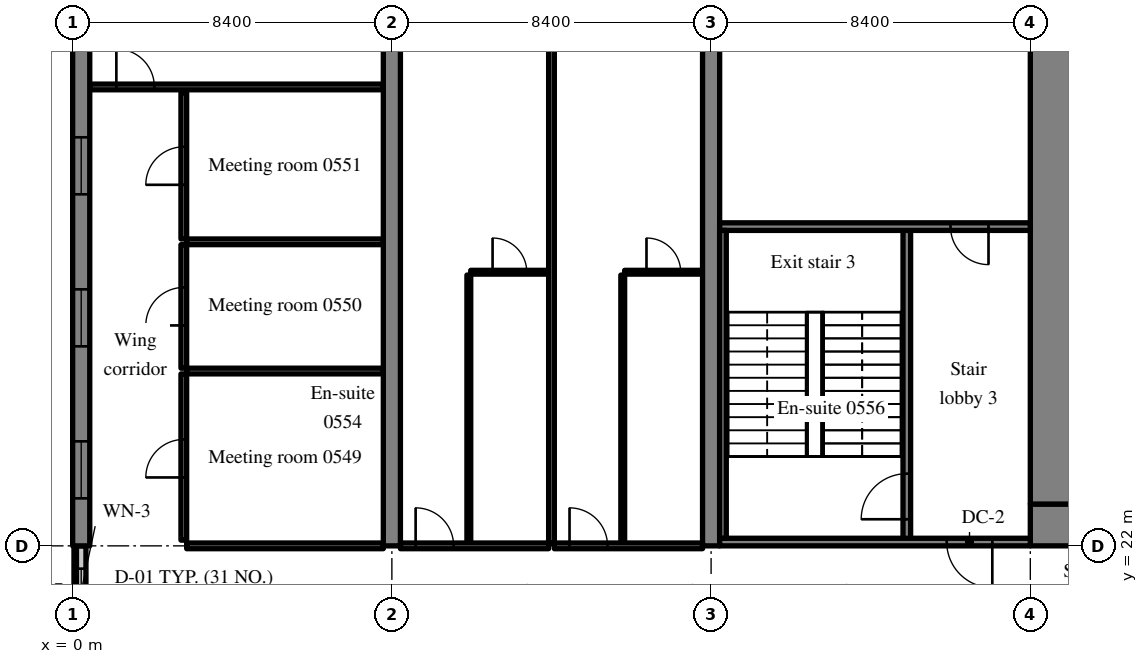
"""IFC4 building model, lengths in metres.
Left out: names, types, materials, properties, quantities, classifications, styles, units other than length and angle.
Written with IfcOpenShell. Run it as: python <this file> out.ifc"""

import sys

from ifc_helpers import new_model, si_unit, direction, frame, frame_2d, origin, place, context, subcontext, project, spatial, rectangle, extrude, source, transform, mapped, element, fill, save


model = new_model("IFC4")
c1 = context("Model", 3, precision=1e-05, world=origin(), true_north=direction((0.0, 1.0)))
c2 = subcontext(c1, "Body", "Model", "MODEL_VIEW")
j1 = project(units=[si_unit("LENGTHUNIT", "METRE"), si_unit("PLANEANGLEUNIT", "RADIAN")], contexts=[c1])
p1 = place(None, origin())
s1 = spatial("IfcSite", under=j1, at=p1, CompositionType="ELEMENT")
p2 = place(p1, origin())
s2 = spatial("IfcBuilding", under=s1, at=p2, CompositionType="ELEMENT")
p3 = place(p2, frame((0.0, 0.0, 27.8)))
s3 = spatial("IfcBuildingStorey", under=s2, at=p3, CompositionType="ELEMENT", Elevation=27.8)
m1 = source(origin(), c2, "Body", "SweptSolid", [
    extrude(rectangle(XDim=50.4, YDim=1.1, at=frame_2d((25.2, 0.0))), origin(), (0.0, 0.0, 1.0), 3.52),
])
p4 = place(p3, frame((25.2, 22.55, 0.0), z_axis=(0.0, 0.0, 1.0), x_axis=(1.0, 0.0, 0.0)))
e1 = element("IfcWall", 1, at=p4, inside=s3, PredefinedType="SHEAR", context=c2, shape_type="MappedRepresentation", body=[
    mapped(m1, transform((0.0, 0.0, 0.0), scale=1.0)),
])
m2 = source(origin(), c2, "Body", "SweptSolid", [
    extrude(rectangle(XDim=1.8, YDim=2.1, at=frame_2d((0.9, 1.05))), frame((0.0, 0.56, 0.0), z_axis=(0.0, -1.0, 0.0), x_axis=(1.0, 0.0, 0.0)), (0.0, 0.0, 1.0), 1.12),
])
p5 = place(p4, frame((15.9, 0.0, 0.0)))
e2 = element("IfcOpeningElement", 2, at=p5, cuts=e1, PredefinedType="OPENING", context=c2, shape_type="MappedRepresentation", body=[
    mapped(m2, transform((0.0, 0.0, 0.0), scale=1.0)),
])
m3 = source(origin(), c2, "Body", "SweptSolid", [
    extrude(rectangle(XDim=1.2, YDim=2.1, at=frame_2d((0.6, 1.05))), frame((0.0, 0.56, 0.0), z_axis=(0.0, -1.0, 0.0), x_axis=(1.0, 0.0, 0.0)), (0.0, 0.0, 1.0), 1.12),
])
p6 = place(p4, frame((27.0, 0.0, 0.0)))
e3 = element("IfcOpeningElement", 3, at=p6, cuts=e1, PredefinedType="OPENING", context=c2, shape_type="MappedRepresentation", body=[
    mapped(m3, transform((0.0, 0.0, 0.0), scale=1.0)),
])
m4 = source(origin(), c2, "Body", "SweptSolid", [
    extrude(rectangle(XDim=0.9, YDim=2.1, at=frame_2d((0.45, 1.05))), frame((0.0, 0.56, 0.0), z_axis=(0.0, -1.0, 0.0), x_axis=(1.0, 0.0, 0.0)), (0.0, 0.0, 1.0), 1.12),
])
p7 = place(p4, frame((32.25, 0.0, 0.0)))
e4 = element("IfcOpeningElement", 4, at=p7, cuts=e1, PredefinedType="OPENING", context=c2, shape_type="MappedRepresentation", body=[
    mapped(m4, transform((0.0, 0.0, 0.0), scale=1.0)),
])
p8 = place(p4, frame((38.25, 0.0, 0.0)))
e5 = element("IfcOpeningElement", 5, at=p8, cuts=e1, PredefinedType="OPENING", context=c2, shape_type="MappedRepresentation", body=[
    mapped(m4, transform((0.0, 0.0, 0.0), scale=1.0)),
])
p9 = place(p4, frame((6.425, 0.0, 0.0)))
e6 = element("IfcOpeningElement", 6, at=p9, cuts=e1, PredefinedType="OPENING", context=c2, shape_type="MappedRepresentation", body=[
    mapped(m3, transform((0.0, 0.0, 0.0), scale=1.0)),
])
p10 = place(p4, frame((47.675, 0.0, 0.0)))
e7 = element("IfcOpeningElement", 7, at=p10, cuts=e1, PredefinedType="OPENING", context=c2, shape_type="MappedRepresentation", body=[
    mapped(m3, transform((0.0, 0.0, 0.0), scale=1.0)),
])
m5 = source(origin(), c2, "Body", "SweptSolid", [
    extrude(rectangle(XDim=17.8, YDim=1.1, at=frame_2d((8.9, 0.0))), origin(), (0.0, 0.0, 1.0), 3.52),
])
p11 = place(p3, frame((25.75, 23.1, 0.0), z_axis=(0.0, 0.0, 1.0), x_axis=(0.0, 1.0, 0.0)))
e8 = element("IfcWall", 8, at=p11, inside=s3, PredefinedType="SHEAR", context=c2, shape_type="MappedRepresentation", body=[
    mapped(m5, transform((0.0, 0.0, 0.0), scale=1.0)),
])
m6 = source(origin(), c2, "Body", "SweptSolid", [
    extrude(rectangle(XDim=16.0, YDim=0.45, at=frame_2d((8.0, 0.0))), origin(), (0.0, 0.0, 1.0), 3.52),
])
p12 = place(p3, frame((0.225, 22.0, 0.0), z_axis=(0.0, 0.0, 1.0), x_axis=(0.0, 1.0, 0.0)))
e9 = element("IfcWall", 9, at=p12, inside=s3, PredefinedType="SHEAR", context=c2, shape_type="MappedRepresentation", body=[
    mapped(m6, transform((0.0, 0.0, 0.0), scale=1.0)),
])
m7 = source(origin(), c2, "Body", "SweptSolid", [
    extrude(rectangle(XDim=1.5, YDim=1.5, at=frame_2d((0.75, 0.75))), frame((0.0, 0.235, 0.0), z_axis=(0.0, -1.0, 0.0), x_axis=(1.0, 0.0, 0.0)), (0.0, 0.0, 1.0), 0.47),
])
p13 = place(p12, frame((1.25, 0.0, 0.9)))
e10 = element("IfcOpeningElement", 10, at=p13, cuts=e9, PredefinedType="OPENING", context=c2, shape_type="MappedRepresentation", body=[
    mapped(m7, transform((0.0, 0.0, 0.0), scale=1.0)),
])
p14 = place(p12, frame((5.25, 0.0, 0.9)))
e11 = element("IfcOpeningElement", 11, at=p14, cuts=e9, PredefinedType="OPENING", context=c2, shape_type="MappedRepresentation", body=[
    mapped(m7, transform((0.0, 0.0, 0.0), scale=1.0)),
])
p15 = place(p12, frame((9.25, 0.0, 0.9)))
e12 = element("IfcOpeningElement", 12, at=p15, cuts=e9, PredefinedType="OPENING", context=c2, shape_type="MappedRepresentation", body=[
    mapped(m7, transform((0.0, 0.0, 0.0), scale=1.0)),
])
p16 = place(p12, frame((13.25, 0.0, 0.9)))
e13 = element("IfcOpeningElement", 13, at=p16, cuts=e9, PredefinedType="OPENING", context=c2, shape_type="MappedRepresentation", body=[
    mapped(m7, transform((0.0, 0.0, 0.0), scale=1.0)),
])
m8 = source(origin(), c2, "Body", "SweptSolid", [
    extrude(rectangle(XDim=20.0, YDim=0.45, at=frame_2d((10.0, 0.0))), origin(), (0.0, 0.0, 1.0), 3.52),
])
for number, where, z_axis, x_axis in (
    (14, (8.4, 22.0, 0.0), (0.0, 0.0, 1.0), (0.0, 1.0, 0.0)),
    (15, (16.8, 22.0, 0.0), (0.0, 0.0, 1.0), (0.0, 1.0, 0.0)),
):
    element("IfcWall", number, at=place(p3, frame(where, z_axis=z_axis, x_axis=x_axis)), inside=s3, PredefinedType="SHEAR", context=c2, shape_type="MappedRepresentation", body=[
        mapped(m8, transform((0.0, 0.0, 0.0), scale=1.0)),
    ])
m9 = source(origin(), c2, "Body", "SweptSolid", [
    extrude(rectangle(XDim=2.4, YDim=0.25, at=frame_2d((1.2, 0.0))), origin(), (0.0, 0.0, 1.0), 2.62),
])
p17 = place(p3, frame((0.225, 19.6, 0.0), z_axis=(0.0, 0.0, 1.0), x_axis=(0.0, 1.0, 0.0)))
e16 = element("IfcWall", 16, at=p17, inside=s3, PredefinedType="SOLIDWALL", context=c2, shape_type="MappedRepresentation", body=[
    mapped(m9, transform((0.0, 0.0, 0.0), scale=1.0)),
])
m10 = source(origin(), c2, "Body", "SweptSolid", [
    extrude(rectangle(XDim=1.2, YDim=1.5, at=frame_2d((0.6, 0.75))), frame((0.0, 0.135, 0.0), z_axis=(0.0, -1.0, 0.0), x_axis=(1.0, 0.0, 0.0)), (0.0, 0.0, 1.0), 0.27),
])
p18 = place(p17, frame((0.6, 0.0, 0.9)))
e17 = element("IfcOpeningElement", 17, at=p18, cuts=e16, PredefinedType="OPENING", context=c2, shape_type="MappedRepresentation", body=[
    mapped(m10, transform((0.0, 0.0, 0.0), scale=1.0)),
])
m11 = source(origin(), c2, "Body", "SweptSolid", [
    extrude(rectangle(XDim=8.3, YDim=0.2, at=frame_2d((4.15, 0.0))), origin(), (0.0, 0.0, 1.0), 3.52),
])
p19 = place(p3, frame((21.95, 22.1, 0.0), z_axis=(0.0, 0.0, 1.0), x_axis=(0.0, 1.0, 0.0)))
e18 = element("IfcWall", 18, at=p19, inside=s3, PredefinedType="SOLIDWALL", context=c2, shape_type="MappedRepresentation", body=[
    mapped(m11, transform((0.0, 0.0, 0.0), scale=1.0)),
])
m12 = source(origin(), c2, "Body", "SweptSolid", [
    extrude(rectangle(XDim=1.2, YDim=2.1, at=frame_2d((0.6, 1.05))), frame((0.0, 0.11, 0.0), z_axis=(0.0, -1.0, 0.0), x_axis=(1.0, 0.0, 0.0)), (0.0, 0.0, 1.0), 0.22),
])
p20 = place(p19, frame((0.6, 0.0, 0.0)))
e19 = element("IfcOpeningElement", 19, at=p20, cuts=e18, PredefinedType="OPENING", context=c2, shape_type="MappedRepresentation", body=[
    mapped(m12, transform((0.0, 0.0, 0.0), scale=1.0)),
])
m13 = source(origin(), c2, "Body", "SweptSolid", [
    extrude(rectangle(XDim=8.175, YDim=0.2, at=frame_2d((4.087, 0.0))), origin(), (0.0, 0.0, 1.0), 3.52),
])
p21 = place(p3, frame((17.025, 22.1, 0.0), z_axis=(0.0, 0.0, 1.0), x_axis=(1.0, 0.0, 0.0)))
e20 = element("IfcWall", 20, at=p21, inside=s3, PredefinedType="SOLIDWALL", context=c2, shape_type="MappedRepresentation", body=[
    mapped(m13, transform((0.0, 0.0, 0.0), scale=1.0)),
])
p22 = place(p21, frame((5.975, 0.0, 0.0)))
e21 = element("IfcOpeningElement", 21, at=p22, cuts=e20, PredefinedType="OPENING", context=c2, shape_type="MappedRepresentation", body=[
    mapped(m12, transform((0.0, 0.0, 0.0), scale=1.0)),
])
p23 = place(p3, frame((17.025, 30.4, 0.0), z_axis=(0.0, 0.0, 1.0), x_axis=(1.0, 0.0, 0.0)))
e22 = element("IfcWall", 22, at=p23, inside=s3, PredefinedType="SOLIDWALL", context=c2, shape_type="MappedRepresentation", body=[
    mapped(m13, transform((0.0, 0.0, 0.0), scale=1.0)),
])
m14 = source(origin(), c2, "Body", "SweptSolid", [
    extrude(rectangle(XDim=1.0, YDim=2.1, at=frame_2d((0.5, 1.05))), frame((0.0, 0.11, 0.0), z_axis=(0.0, -1.0, 0.0), x_axis=(1.0, 0.0, 0.0)), (0.0, 0.0, 1.0), 0.22),
])
p24 = place(p23, frame((6.075, 0.0, 0.0)))
e23 = element("IfcOpeningElement", 23, at=p24, cuts=e22, PredefinedType="OPENING", context=c2, shape_type="MappedRepresentation", body=[
    mapped(m14, transform((0.0, 0.0, 0.0), scale=1.0)),
])
m15 = source(origin(), c2, "Body", "SweptSolid", [
    extrude(rectangle(XDim=8.1, YDim=0.175, at=frame_2d((4.05, 0.0))), origin(), (0.0, 0.0, 1.0), 3.52),
])
p25 = place(p3, frame((17.112, 22.2, 0.0), z_axis=(0.0, 0.0, 1.0), x_axis=(0.0, 1.0, 0.0)))
e24 = element("IfcWall", 24, at=p25, inside=s3, PredefinedType="SOLIDWALL", context=c2, shape_type="MappedRepresentation", body=[
    mapped(m15, transform((0.0, 0.0, 0.0), scale=1.0)),
])
m16 = source(origin(), c2, "Body", "SweptSolid", [
    extrude(rectangle(XDim=5.175, YDim=0.15, at=frame_2d((2.587, 0.0))), origin(), (0.0, 0.0, 1.0), 2.82),
])
p26 = place(p3, frame((3.0, 22.0, 0.0), z_axis=(0.0, 0.0, 1.0), x_axis=(1.0, 0.0, 0.0)))
e25 = element("IfcWall", 25, at=p26, inside=s3, PredefinedType="PARTITIONING", context=c2, shape_type="MappedRepresentation", body=[
    mapped(m16, transform((0.0, 0.0, 0.0), scale=1.0)),
])
m17 = source(origin(), c2, "Body", "SweptSolid", [
    extrude(rectangle(XDim=4.375, YDim=0.15, at=frame_2d((2.188, 0.0))), origin(), (0.0, 0.0, 1.0), 3.52),
])
p27 = place(p3, frame((2.925, 22.15, 0.0), z_axis=(0.0, 0.0, 1.0), x_axis=(0.0, 1.0, 0.0)))
e26 = element("IfcWall", 26, at=p27, inside=s3, PredefinedType="PARTITIONING", context=c2, shape_type="MappedRepresentation", body=[
    mapped(m17, transform((0.0, 0.0, 0.0), scale=1.0)),
])
m18 = source(origin(), c2, "Body", "SweptSolid", [
    extrude(rectangle(XDim=1.0, YDim=2.1, at=frame_2d((0.5, 1.05))), frame((0.0, 0.085, 0.0), z_axis=(0.0, -1.0, 0.0), x_axis=(1.0, 0.0, 0.0)), (0.0, 0.0, 1.0), 0.17),
])
p28 = place(p27, frame((1.65, 0.0, 0.0)))
e27 = element("IfcOpeningElement", 27, at=p28, cuts=e26, PredefinedType="OPENING", context=c2, shape_type="MappedRepresentation", body=[
    mapped(m18, transform((0.0, 0.0, 0.0), scale=1.0)),
])
m19 = source(origin(), c2, "Body", "SweptSolid", [
    extrude(rectangle(XDim=5.175, YDim=0.15, at=frame_2d((2.587, 0.0))), origin(), (0.0, 0.0, 1.0), 3.52),
])
p29 = place(p3, frame((3.0, 26.6, 0.0), z_axis=(0.0, 0.0, 1.0), x_axis=(1.0, 0.0, 0.0)))
e28 = element("IfcWall", 28, at=p29, inside=s3, PredefinedType="PARTITIONING", context=c2, shape_type="MappedRepresentation", body=[
    mapped(m19, transform((0.0, 0.0, 0.0), scale=1.0)),
])
m20 = source(origin(), c2, "Body", "SweptSolid", [
    extrude(rectangle(XDim=3.25, YDim=0.15, at=frame_2d((1.625, 0.0))), origin(), (0.0, 0.0, 1.0), 3.52),
])
p30 = place(p3, frame((2.925, 26.675, 0.0), z_axis=(0.0, 0.0, 1.0), x_axis=(0.0, 1.0, 0.0)))
e29 = element("IfcWall", 29, at=p30, inside=s3, PredefinedType="PARTITIONING", context=c2, shape_type="MappedRepresentation", body=[
    mapped(m20, transform((0.0, 0.0, 0.0), scale=1.0)),
])
p31 = place(p30, frame((1.125, 0.0, 0.0)))
e30 = element("IfcOpeningElement", 30, at=p31, cuts=e29, PredefinedType="OPENING", context=c2, shape_type="MappedRepresentation", body=[
    mapped(m18, transform((0.0, 0.0, 0.0), scale=1.0)),
])
p32 = place(p3, frame((3.0, 30.0, 0.0), z_axis=(0.0, 0.0, 1.0), x_axis=(1.0, 0.0, 0.0)))
e31 = element("IfcWall", 31, at=p32, inside=s3, PredefinedType="PARTITIONING", context=c2, shape_type="MappedRepresentation", body=[
    mapped(m19, transform((0.0, 0.0, 0.0), scale=1.0)),
])
m21 = source(origin(), c2, "Body", "SweptSolid", [
    extrude(rectangle(XDim=3.85, YDim=0.15, at=frame_2d((1.925, 0.0))), origin(), (0.0, 0.0, 1.0), 3.52),
])
p33 = place(p3, frame((2.925, 30.075, 0.0), z_axis=(0.0, 0.0, 1.0), x_axis=(0.0, 1.0, 0.0)))
e32 = element("IfcWall", 32, at=p33, inside=s3, PredefinedType="PARTITIONING", context=c2, shape_type="MappedRepresentation", body=[
    mapped(m21, transform((0.0, 0.0, 0.0), scale=1.0)),
])
p34 = place(p33, frame((1.425, 0.0, 0.0)))
e33 = element("IfcOpeningElement", 33, at=p34, cuts=e32, PredefinedType="OPENING", context=c2, shape_type="MappedRepresentation", body=[
    mapped(m18, transform((0.0, 0.0, 0.0), scale=1.0)),
])
m22 = source(origin(), c2, "Body", "SweptSolid", [
    extrude(rectangle(XDim=7.725, YDim=0.15, at=frame_2d((3.863, 0.0))), origin(), (0.0, 0.0, 1.0), 3.52),
])
p35 = place(p3, frame((0.45, 34.075, 0.0), z_axis=(0.0, 0.0, 1.0), x_axis=(1.0, 0.0, 0.0)))
e34 = element("IfcWall", 34, at=p35, inside=s3, PredefinedType="PARTITIONING", context=c2, shape_type="MappedRepresentation", body=[
    mapped(m22, transform((0.0, 0.0, 0.0), scale=1.0)),
])
p36 = place(p35, frame((0.7, 0.0, 0.0)))
e35 = element("IfcOpeningElement", 35, at=p36, cuts=e34, PredefinedType="OPENING", context=c2, shape_type="MappedRepresentation", body=[
    mapped(m18, transform((0.0, 0.0, 0.0), scale=1.0)),
])
m23 = source(origin(), c2, "Body", "SweptSolid", [
    extrude(rectangle(XDim=7.05, YDim=0.1, at=frame_2d((3.525, 0.0))), origin(), (0.0, 0.0, 1.0), 3.52),
])
p37 = place(p3, frame((10.425, 22.075, 0.0), z_axis=(0.0, 0.0, 1.0), x_axis=(0.0, 1.0, 0.0)))
e36 = element("IfcWall", 36, at=p37, inside=s3, PredefinedType="PARTITIONING", context=c2, shape_type="MappedRepresentation", body=[
    mapped(m23, transform((0.0, 0.0, 0.0), scale=1.0)),
])
m24 = source(origin(), c2, "Body", "SweptSolid", [
    extrude(rectangle(XDim=2.05, YDim=0.1, at=frame_2d((1.025, 0.0))), origin(), (0.0, 0.0, 1.0), 3.52),
])
p38 = place(p3, frame((10.475, 29.2, 0.0), z_axis=(0.0, 0.0, 1.0), x_axis=(1.0, 0.0, 0.0)))
e37 = element("IfcWall", 37, at=p38, inside=s3, PredefinedType="PARTITIONING", context=c2, shape_type="MappedRepresentation", body=[
    mapped(m24, transform((0.0, 0.0, 0.0), scale=1.0)),
])
m25 = source(origin(), c2, "Body", "SweptSolid", [
    extrude(rectangle(XDim=0.9, YDim=2.1, at=frame_2d((0.45, 1.05))), frame((0.0, 0.06, 0.0), z_axis=(0.0, -1.0, 0.0), x_axis=(1.0, 0.0, 0.0)), (0.0, 0.0, 1.0), 0.12),
])
p39 = place(p38, frame((0.575, 0.0, 0.0)))
e38 = element("IfcOpeningElement", 38, at=p39, cuts=e37, PredefinedType="OPENING", context=c2, shape_type="MappedRepresentation", body=[
    mapped(m25, transform((0.0, 0.0, 0.0), scale=1.0)),
])
m26 = source(origin(), c2, "Body", "SweptSolid", [
    extrude(rectangle(XDim=3.9, YDim=0.15, at=frame_2d((1.95, 0.0))), origin(), (0.0, 0.0, 1.0), 2.82),
])
p40 = place(p3, frame((8.625, 22.0, 0.0), z_axis=(0.0, 0.0, 1.0), x_axis=(1.0, 0.0, 0.0)))
e39 = element("IfcWall", 39, at=p40, inside=s3, PredefinedType="PARTITIONING", context=c2, shape_type="MappedRepresentation", body=[
    mapped(m26, transform((0.0, 0.0, 0.0), scale=1.0)),
])
p41 = place(p40, frame((0.4, 0.0, 0.0)))
e40 = element("IfcOpeningElement", 40, at=p41, cuts=e39, PredefinedType="OPENING", context=c2, shape_type="MappedRepresentation", body=[
    mapped(m18, transform((0.0, 0.0, 0.0), scale=1.0)),
])
p42 = place(p3, frame((14.475, 22.075, 0.0), z_axis=(0.0, 0.0, 1.0), x_axis=(0.0, 1.0, 0.0)))
e41 = element("IfcWall", 41, at=p42, inside=s3, PredefinedType="PARTITIONING", context=c2, shape_type="MappedRepresentation", body=[
    mapped(m23, transform((0.0, 0.0, 0.0), scale=1.0)),
])
m27 = source(origin(), c2, "Body", "SweptSolid", [
    extrude(rectangle(XDim=2.05, YDim=0.1, at=frame_2d((1.025, 0.0))), origin(), (0.0, 0.0, 1.0), 3.52),
])
p43 = place(p3, frame((14.525, 29.2, 0.0), z_axis=(0.0, 0.0, 1.0), x_axis=(1.0, 0.0, 0.0)))
e42 = element("IfcWall", 42, at=p43, inside=s3, PredefinedType="PARTITIONING", context=c2, shape_type="MappedRepresentation", body=[
    mapped(m27, transform((0.0, 0.0, 0.0), scale=1.0)),
])
p44 = place(p43, frame((0.575, 0.0, 0.0)))
e43 = element("IfcOpeningElement", 43, at=p44, cuts=e42, PredefinedType="OPENING", context=c2, shape_type="MappedRepresentation", body=[
    mapped(m25, transform((0.0, 0.0, 0.0), scale=1.0)),
])
p45 = place(p3, frame((12.675, 22.0, 0.0), z_axis=(0.0, 0.0, 1.0), x_axis=(1.0, 0.0, 0.0)))
e44 = element("IfcWall", 44, at=p45, inside=s3, PredefinedType="PARTITIONING", context=c2, shape_type="MappedRepresentation", body=[
    mapped(m26, transform((0.0, 0.0, 0.0), scale=1.0)),
])
p46 = place(p45, frame((0.4, 0.0, 0.0)))
e45 = element("IfcOpeningElement", 45, at=p46, cuts=e44, PredefinedType="OPENING", context=c2, shape_type="MappedRepresentation", body=[
    mapped(m18, transform((0.0, 0.0, 0.0), scale=1.0)),
])
m28 = source(origin(), c2, "Body", "SweptSolid", [
    extrude(rectangle(XDim=19.025, YDim=0.15, at=frame_2d((9.513, 0.0))), origin(), (0.0, 0.0, 1.0), 3.52),
])
p47 = place(p3, frame((12.6, 22.075, 0.0), z_axis=(0.0, 0.0, 1.0), x_axis=(0.0, 1.0, 0.0)))
e46 = element("IfcWall", 46, at=p47, inside=s3, PredefinedType="PARTITIONING", context=c2, shape_type="MappedRepresentation", body=[
    mapped(m28, transform((0.0, 0.0, 0.0), scale=1.0)),
])
m29 = source(origin(), c2, "Body", "SweptSolid", [
    extrude(rectangle(XDim=1.5, YDim=1.5, at=frame_2d((0.75, 0.75))), frame((0.0, 0.03, 0.0), z_axis=(0.0, -1.0, 0.0), x_axis=(1.0, 0.0, 0.0)), (0.0, 0.0, 1.0), 0.06),
])
p48 = place(p13, origin())
e47 = element("IfcWindow", 47, at=p48, inside=s3, PartitioningType="SINGLE_PANEL", PredefinedType="WINDOW", context=c2, shape_type="MappedRepresentation", body=[
    mapped(m29, transform((0.0, 0.0, 0.0), scale=1.0)),
])
fill(e10, e47)
p49 = place(p14, origin())
e48 = element("IfcWindow", 48, at=p49, inside=s3, PartitioningType="SINGLE_PANEL", PredefinedType="WINDOW", context=c2, shape_type="MappedRepresentation", body=[
    mapped(m29, transform((0.0, 0.0, 0.0), scale=1.0)),
])
fill(e11, e48)
p50 = place(p15, origin())
e49 = element("IfcWindow", 49, at=p50, inside=s3, PartitioningType="SINGLE_PANEL", PredefinedType="WINDOW", context=c2, shape_type="MappedRepresentation", body=[
    mapped(m29, transform((0.0, 0.0, 0.0), scale=1.0)),
])
fill(e12, e49)
m30 = source(origin(), c2, "Body", "SweptSolid", [
    extrude(rectangle(XDim=1.2, YDim=1.5, at=frame_2d((0.6, 0.75))), frame((0.0, 0.03, 0.0), z_axis=(0.0, -1.0, 0.0), x_axis=(1.0, 0.0, 0.0)), (0.0, 0.0, 1.0), 0.06),
])
p51 = place(p18, origin())
e50 = element("IfcWindow", 50, at=p51, inside=s3, PartitioningType="SINGLE_PANEL", PredefinedType="WINDOW", context=c2, shape_type="MappedRepresentation", body=[
    mapped(m30, transform((0.0, 0.0, 0.0), scale=1.0)),
])
fill(e17, e50)
m31 = source(origin(), c2, "Body", "SweptSolid", [
    extrude(rectangle(XDim=1.2, YDim=2.1, at=frame_2d((0.6, 1.05))), frame((0.0, 0.025, 0.0), z_axis=(0.0, -1.0, 0.0), x_axis=(1.0, 0.0, 0.0)), (0.0, 0.0, 1.0), 0.05),
])
p52 = place(p20, origin())
e51 = element("IfcDoor", 51, at=p52, inside=s3, OperationType="SINGLE_SWING_LEFT", PredefinedType="DOOR", context=c2, shape_type="MappedRepresentation", body=[
    mapped(m31, transform((0.0, 0.0, 0.0), scale=1.0)),
])
fill(e19, e51)
p53 = place(p22, origin())
e52 = element("IfcDoor", 52, at=p53, inside=s3, OperationType="SINGLE_SWING_RIGHT", PredefinedType="DOOR", context=c2, shape_type="MappedRepresentation", body=[
    mapped(m31, transform((0.0, 0.0, 0.0), scale=1.0)),
])
fill(e21, e52)
m32 = source(origin(), c2, "Body", "SweptSolid", [
    extrude(rectangle(XDim=1.0, YDim=2.1, at=frame_2d((0.5, 1.05))), frame((0.0, 0.025, 0.0), z_axis=(0.0, -1.0, 0.0), x_axis=(1.0, 0.0, 0.0)), (0.0, 0.0, 1.0), 0.05),
])
p54 = place(p24, origin())
e53 = element("IfcDoor", 53, at=p54, inside=s3, OperationType="SINGLE_SWING_RIGHT", PredefinedType="DOOR", context=c2, shape_type="MappedRepresentation", body=[
    mapped(m32, transform((0.0, 0.0, 0.0), scale=1.0)),
])
fill(e23, e53)
p55 = place(p28, origin())
e54 = element("IfcDoor", 54, at=p55, inside=s3, OperationType="SINGLE_SWING_LEFT", PredefinedType="DOOR", context=c2, shape_type="MappedRepresentation", body=[
    mapped(m32, transform((0.0, 0.0, 0.0), scale=1.0)),
])
fill(e27, e54)
p56 = place(p31, origin())
e55 = element("IfcDoor", 55, at=p56, inside=s3, OperationType="SINGLE_SWING_LEFT", PredefinedType="DOOR", context=c2, shape_type="MappedRepresentation", body=[
    mapped(m32, transform((0.0, 0.0, 0.0), scale=1.0)),
])
fill(e30, e55)
p57 = place(p34, origin())
e56 = element("IfcDoor", 56, at=p57, inside=s3, OperationType="SINGLE_SWING_LEFT", PredefinedType="DOOR", context=c2, shape_type="MappedRepresentation", body=[
    mapped(m32, transform((0.0, 0.0, 0.0), scale=1.0)),
])
fill(e33, e56)
p58 = place(p36, origin())
e57 = element("IfcDoor", 57, at=p58, inside=s3, OperationType="SINGLE_SWING_LEFT", PredefinedType="DOOR", context=c2, shape_type="MappedRepresentation", body=[
    mapped(m32, transform((0.0, 0.0, 0.0), scale=1.0)),
])
fill(e35, e57)
m33 = source(origin(), c2, "Body", "SweptSolid", [
    extrude(rectangle(XDim=0.9, YDim=2.1, at=frame_2d((0.45, 1.05))), frame((0.0, 0.025, 0.0), z_axis=(0.0, -1.0, 0.0), x_axis=(1.0, 0.0, 0.0)), (0.0, 0.0, 1.0), 0.05),
])
p59 = place(p39, origin())
e58 = element("IfcDoor", 58, at=p59, inside=s3, OperationType="SINGLE_SWING_LEFT", PredefinedType="DOOR", context=c2, shape_type="MappedRepresentation", body=[
    mapped(m33, transform((0.0, 0.0, 0.0), scale=1.0)),
])
fill(e38, e58)
p60 = place(p41, origin())
e59 = element("IfcDoor", 59, at=p60, inside=s3, OperationType="SINGLE_SWING_LEFT", PredefinedType="DOOR", context=c2, shape_type="MappedRepresentation", body=[
    mapped(m32, transform((0.0, 0.0, 0.0), scale=1.0)),
])
fill(e40, e59)
p61 = place(p44, origin())
e60 = element("IfcDoor", 60, at=p61, inside=s3, OperationType="SINGLE_SWING_LEFT", PredefinedType="DOOR", context=c2, shape_type="MappedRepresentation", body=[
    mapped(m33, transform((0.0, 0.0, 0.0), scale=1.0)),
])
fill(e43, e60)
p62 = place(p46, origin())
e61 = element("IfcDoor", 61, at=p62, inside=s3, OperationType="SINGLE_SWING_LEFT", PredefinedType="DOOR", context=c2, shape_type="MappedRepresentation", body=[
    mapped(m32, transform((0.0, 0.0, 0.0), scale=1.0)),
])
fill(e45, e61)
save(model, sys.argv[1])
